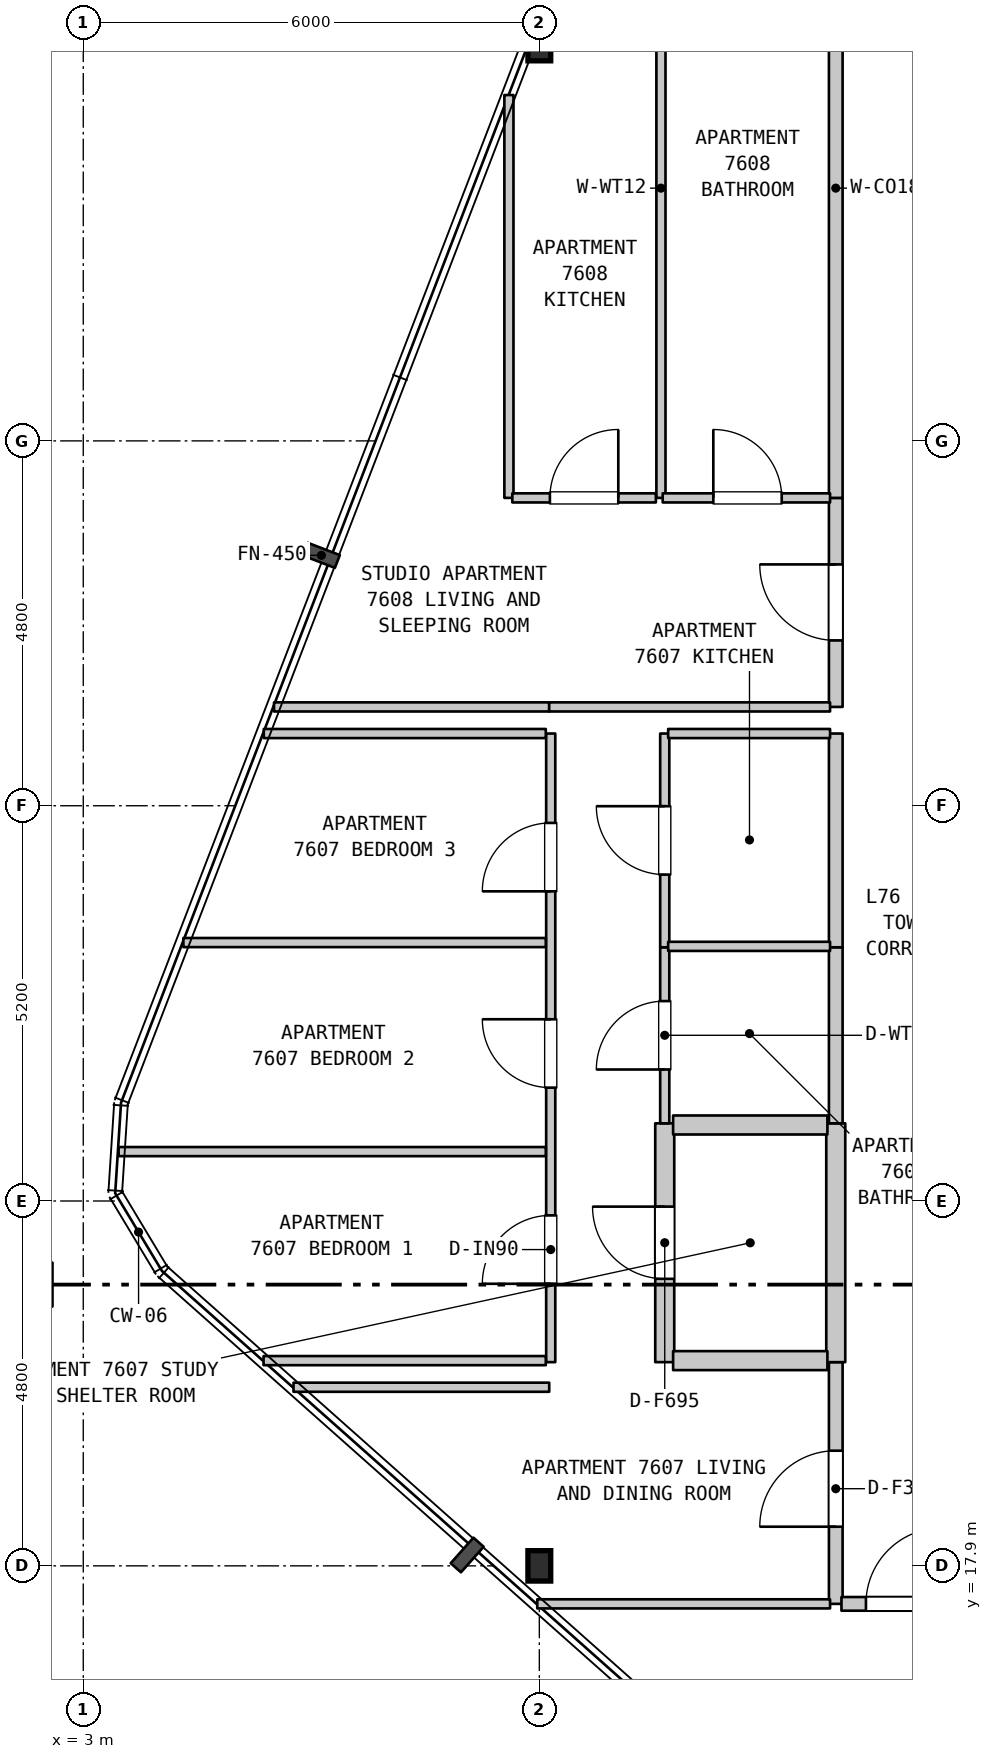
"""IFC4 building model, lengths in metres.
Left out: names, types, materials, properties, quantities, classifications, styles, units other than length and angle.
Written with IfcOpenShell. Run it as: python <this file> out.ifc"""

import sys

from ifc_helpers import new_model, si_unit, direction, frame, frame_2d, origin, origin_2d, place, context, subcontext, project, spatial, rectangle, i_section, extrude, element, fill, save


model = new_model("IFC4")
c1 = context("Model", 3, precision=1e-05, world=origin(), true_north=direction((0.0, 1.0)))
c2 = subcontext(c1, "Body", "Model", "MODEL_VIEW")
j1 = project(units=[si_unit("LENGTHUNIT", "METRE"), si_unit("PLANEANGLEUNIT", "RADIAN")], contexts=[c1])
p1 = place(None, origin())
s1 = spatial("IfcSite", under=j1, at=p1, CompositionType="ELEMENT")
p2 = place(p1, origin())
s2 = spatial("IfcBuilding", under=s1, at=p2, CompositionType="ELEMENT")
p3 = place(p2, frame((0.0, 0.0, 303.6)))
s3 = spatial("IfcBuildingStorey", under=s2, at=p3, CompositionType="ELEMENT", Elevation=303.6)
for number, where, z_axis, x_axis in (
    (1, (9.0, 17.9, 0.0), (0.0, 0.0, 1.0), (1.0, 0.0, 0.0)),
    (2, (9.0, 37.9, 0.0), (0.0, 0.0, 1.0), (1.0, 0.0, 0.0)),
):
    element("IfcColumn", number, at=place(p3, frame(where, z_axis=z_axis, x_axis=x_axis)), inside=s3, PredefinedType="COLUMN", context=c2, shape_type="SweptSolid", body=[
        extrude(i_section(OverallWidth=0.3, OverallDepth=0.4, WebThickness=0.013, FlangeThickness=0.024, FilletRadius=0.027, at=origin_2d()), origin(), (0.0, 0.0, 1.0), 3.7),
    ])
p4 = place(p3, frame((8.6, 31.95, 0.0), z_axis=(0.0, 0.0, 1.0), x_axis=(0.0, 1.0, 0.0)))
e3 = element("IfcWall", 3, at=p4, inside=s3, PredefinedType="PARTITIONING", context=c2, shape_type="SweptSolid", body=[
    extrude(rectangle(XDim=5.3, YDim=0.12, at=frame_2d((2.65, 0.0))), origin(), (0.0, 0.0, 1.0), 3.39),
])
p5 = place(p3, frame((9.15, 20.58, 0.0), z_axis=(0.0, 0.0, 1.0), x_axis=(0.0, 1.0, 0.0)))
e4 = element("IfcWall", 4, at=p5, inside=s3, PredefinedType="PARTITIONING", context=c2, shape_type="SweptSolid", body=[
    extrude(rectangle(XDim=8.27, YDim=0.12, at=frame_2d((4.135, 0.0))), origin(), (0.0, 0.0, 1.0), 2.79),
])
p6 = place(p5, frame((1.031, 0.0, 0.0)))
e5 = element("IfcOpeningElement", 5, at=p6, cuts=e4, PredefinedType="OPENING", context=c2, shape_type="SweptSolid", body=[
    extrude(rectangle(XDim=0.9, YDim=2.15, at=frame_2d((0.45, 1.075))), frame((0.0, 0.07, 0.0), z_axis=(0.0, -1.0, 0.0), x_axis=(1.0, 0.0, 0.0)), (0.0, 0.0, 1.0), 0.14),
])
p7 = place(p5, frame((3.611, 0.0, 0.0)))
e6 = element("IfcOpeningElement", 6, at=p7, cuts=e4, PredefinedType="OPENING", context=c2, shape_type="SweptSolid", body=[
    extrude(rectangle(XDim=0.9, YDim=2.15, at=frame_2d((0.45, 1.075))), frame((0.0, 0.07, 0.0), z_axis=(0.0, -1.0, 0.0), x_axis=(1.0, 0.0, 0.0)), (0.0, 0.0, 1.0), 0.14),
])
p8 = place(p5, frame((6.194, 0.0, 0.0)))
e7 = element("IfcOpeningElement", 7, at=p8, cuts=e4, PredefinedType="OPENING", context=c2, shape_type="SweptSolid", body=[
    extrude(rectangle(XDim=0.9, YDim=2.15, at=frame_2d((0.45, 1.075))), frame((0.0, 0.07, 0.0), z_axis=(0.0, -1.0, 0.0), x_axis=(1.0, 0.0, 0.0)), (0.0, 0.0, 1.0), 0.14),
])
p9 = place(p3, frame((10.6, 31.95, 0.0), z_axis=(0.0, 0.0, 1.0), x_axis=(0.0, 1.0, 0.0)))
e8 = element("IfcWall", 8, at=p9, inside=s3, PredefinedType="PARTITIONING", context=c2, shape_type="SweptSolid", body=[
    extrude(rectangle(XDim=8.15, YDim=0.12, at=frame_2d((4.075, 0.0))), origin(), (0.0, 0.0, 1.0), 3.39),
])
p10 = place(p3, frame((10.65, 20.58, 0.0), z_axis=(0.0, 0.0, 1.0), x_axis=(0.0, 1.0, 0.0)))
e9 = element("IfcWall", 9, at=p10, inside=s3, PredefinedType="STANDARD", context=c2, shape_type="SweptSolid", body=[
    extrude(rectangle(XDim=3.142, YDim=0.25, at=frame_2d((1.571, 0.0))), origin(), (0.0, 0.0, 1.0), 3.39),
])
p11 = place(p10, frame((1.096, 0.0, 0.0)))
e10 = element("IfcOpeningElement", 10, at=p11, cuts=e9, PredefinedType="OPENING", context=c2, shape_type="SweptSolid", body=[
    extrude(rectangle(XDim=0.95, YDim=2.15, at=frame_2d((0.475, 1.075))), frame((0.0, 0.135, 0.0), z_axis=(0.0, -1.0, 0.0), x_axis=(1.0, 0.0, 0.0)), (0.0, 0.0, 1.0), 0.27),
])
p12 = place(p3, frame((10.65, 23.722, 0.0), z_axis=(0.0, 0.0, 1.0), x_axis=(0.0, 1.0, 0.0)))
e11 = element("IfcWall", 11, at=p12, inside=s3, PredefinedType="PARTITIONING", context=c2, shape_type="SweptSolid", body=[
    extrude(rectangle(XDim=2.316, YDim=0.12, at=frame_2d((1.158, 0.0))), origin(), (0.0, 0.0, 1.0), 3.39),
])
p13 = place(p12, frame((0.708, 0.0, 0.0)))
e12 = element("IfcOpeningElement", 12, at=p13, cuts=e11, PredefinedType="OPENING", context=c2, shape_type="SweptSolid", body=[
    extrude(rectangle(XDim=0.9, YDim=2.1, at=frame_2d((0.45, 1.05))), frame((0.0, 0.07, 0.0), z_axis=(0.0, -1.0, 0.0), x_axis=(1.0, 0.0, 0.0)), (0.0, 0.0, 1.0), 0.14),
])
p14 = place(p3, frame((10.65, 26.038, 0.0), z_axis=(0.0, 0.0, 1.0), x_axis=(0.0, 1.0, 0.0)))
e13 = element("IfcWall", 13, at=p14, inside=s3, PredefinedType="PARTITIONING", context=c2, shape_type="SweptSolid", body=[
    extrude(rectangle(XDim=2.812, YDim=0.12, at=frame_2d((1.406, 0.0))), origin(), (0.0, 0.0, 1.0), 3.39),
])
p15 = place(p14, frame((0.956, 0.0, 0.0)))
e14 = element("IfcOpeningElement", 14, at=p15, cuts=e13, PredefinedType="OPENING", context=c2, shape_type="SweptSolid", body=[
    extrude(rectangle(XDim=0.9, YDim=2.15, at=frame_2d((0.45, 1.075))), frame((0.0, 0.07, 0.0), z_axis=(0.0, -1.0, 0.0), x_axis=(1.0, 0.0, 0.0)), (0.0, 0.0, 1.0), 0.14),
])
p16 = place(p3, frame((12.9, 17.4, 0.0), z_axis=(0.0, 0.0, 1.0), x_axis=(0.0, 1.0, 0.0)))
e15 = element("IfcWall", 15, at=p16, inside=s3, PredefinedType="STANDARD", context=c2, shape_type="SweptSolid", body=[
    extrude(rectangle(XDim=3.18, YDim=0.18, at=frame_2d((1.59, 0.0))), origin(), (0.0, 0.0, 1.0), 3.39),
])
p17 = place(p16, frame((1.015, 0.0, 0.0)))
e16 = element("IfcOpeningElement", 16, at=p17, cuts=e15, PredefinedType="OPENING", context=c2, shape_type="SweptSolid", body=[
    extrude(rectangle(XDim=1.0, YDim=2.15, at=frame_2d((0.5, 1.075))), frame((0.0, 0.1, 0.0), z_axis=(0.0, -1.0, 0.0), x_axis=(1.0, 0.0, 0.0)), (0.0, 0.0, 1.0), 0.2),
])
p18 = place(p3, frame((12.9, 20.58, 0.0), z_axis=(0.0, 0.0, 1.0), x_axis=(0.0, 1.0, 0.0)))
e17 = element("IfcWall", 17, at=p18, inside=s3, PredefinedType="STANDARD", context=c2, shape_type="SweptSolid", body=[
    extrude(rectangle(XDim=3.142, YDim=0.25, at=frame_2d((1.571, 0.0))), origin(), (0.0, 0.0, 1.0), 3.39),
])
p19 = place(p3, frame((12.9, 23.722, 0.0), z_axis=(0.0, 0.0, 1.0), x_axis=(0.0, 1.0, 0.0)))
e18 = element("IfcWall", 18, at=p19, inside=s3, PredefinedType="STANDARD", context=c2, shape_type="SweptSolid", body=[
    extrude(rectangle(XDim=2.316, YDim=0.18, at=frame_2d((1.158, 0.0))), origin(), (0.0, 0.0, 1.0), 3.39),
])
p20 = place(p3, frame((12.9, 26.038, 0.0), z_axis=(0.0, 0.0, 1.0), x_axis=(0.0, 1.0, 0.0)))
e19 = element("IfcWall", 19, at=p20, inside=s3, PredefinedType="STANDARD", context=c2, shape_type="SweptSolid", body=[
    extrude(rectangle(XDim=2.812, YDim=0.18, at=frame_2d((1.406, 0.0))), origin(), (0.0, 0.0, 1.0), 3.39),
])
p21 = place(p3, frame((12.9, 29.2, 0.0), z_axis=(0.0, 0.0, 1.0), x_axis=(0.0, 1.0, 0.0)))
e20 = element("IfcWall", 20, at=p21, inside=s3, PredefinedType="STANDARD", context=c2, shape_type="SweptSolid", body=[
    extrude(rectangle(XDim=2.75, YDim=0.18, at=frame_2d((1.375, 0.0))), origin(), (0.0, 0.0, 1.0), 3.39),
])
p22 = place(p21, frame((0.875, 0.0, 0.0)))
e21 = element("IfcOpeningElement", 21, at=p22, cuts=e20, PredefinedType="OPENING", context=c2, shape_type="SweptSolid", body=[
    extrude(rectangle(XDim=1.0, YDim=2.15, at=frame_2d((0.5, 1.075))), frame((0.0, 0.1, 0.0), z_axis=(0.0, -1.0, 0.0), x_axis=(1.0, 0.0, 0.0)), (0.0, 0.0, 1.0), 0.2),
])
p23 = place(p3, frame((12.9, 31.95, 0.0), z_axis=(0.0, 0.0, 1.0), x_axis=(0.0, 1.0, 0.0)))
e22 = element("IfcWall", 22, at=p23, inside=s3, PredefinedType="STANDARD", context=c2, shape_type="SweptSolid", body=[
    extrude(rectangle(XDim=8.15, YDim=0.18, at=frame_2d((4.075, 0.0))), origin(), (0.0, 0.0, 1.0), 3.39),
])
p24 = place(p3, frame((8.973, 17.4, 0.0), z_axis=(0.0, 0.0, 1.0), x_axis=(1.0, 0.0, 0.0)))
e23 = element("IfcWall", 23, at=p24, inside=s3, PredefinedType="PARTITIONING", context=c2, shape_type="SweptSolid", body=[
    extrude(rectangle(XDim=3.852, YDim=0.12, at=frame_2d((1.926, 0.0))), origin(), (0.0, 0.0, 1.0), 3.39),
])
p25 = place(p3, frame((12.975, 17.4, 0.0), z_axis=(0.0, 0.0, 1.0), x_axis=(1.0, 0.0, 0.0)))
e24 = element("IfcWall", 24, at=p25, inside=s3, PredefinedType="STANDARD", context=c2, shape_type="SweptSolid", body=[
    extrude(rectangle(XDim=3.68, YDim=0.18, at=frame_2d((1.84, 0.0))), origin(), (0.0, 0.0, 1.0), 3.39),
])
p26 = place(p25, frame((0.322, 0.0, 0.0)))
e25 = element("IfcOpeningElement", 25, at=p26, cuts=e24, PredefinedType="OPENING", context=c2, shape_type="SweptSolid", body=[
    extrude(rectangle(XDim=1.0, YDim=2.15, at=frame_2d((0.5, 1.075))), frame((0.0, 0.1, 0.0), z_axis=(0.0, -1.0, 0.0), x_axis=(1.0, 0.0, 0.0)), (0.0, 0.0, 1.0), 0.2),
])
p27 = place(p3, frame((5.766, 20.25, 0.0), z_axis=(0.0, 0.0, 1.0), x_axis=(1.0, 0.0, 0.0)))
e26 = element("IfcWall", 26, at=p27, inside=s3, PredefinedType="PARTITIONING", context=c2, shape_type="SweptSolid", body=[
    extrude(rectangle(XDim=3.364, YDim=0.12, at=frame_2d((1.682, 0.0))), origin(), (0.0, 0.0, 1.0), 3.39),
])
p28 = place(p3, frame((5.372, 20.6, 0.0), z_axis=(0.0, 0.0, 1.0), x_axis=(1.0, 0.0, 0.0)))
e27 = element("IfcWall", 27, at=p28, inside=s3, PredefinedType="PARTITIONING", context=c2, shape_type="SweptSolid", body=[
    extrude(rectangle(XDim=3.713, YDim=0.12, at=frame_2d((1.856, 0.0))), origin(), (0.0, 0.0, 1.0), 3.39),
])
p29 = place(p3, frame((10.76, 20.6, 0.0), z_axis=(0.0, 0.0, 1.0), x_axis=(1.0, 0.0, 0.0)))
e28 = element("IfcWall", 28, at=p29, inside=s3, PredefinedType="STANDARD", context=c2, shape_type="SweptSolid", body=[
    extrude(rectangle(XDim=2.03, YDim=0.25, at=frame_2d((1.015, 0.0))), origin(), (0.0, 0.0, 1.0), 3.39),
])
p30 = place(p3, frame((3.465, 23.35, 0.0), z_axis=(0.0, 0.0, 1.0), x_axis=(1.0, 0.0, 0.0)))
e29 = element("IfcWall", 29, at=p30, inside=s3, PredefinedType="PARTITIONING", context=c2, shape_type="SweptSolid", body=[
    extrude(rectangle(XDim=5.62, YDim=0.12, at=frame_2d((2.81, 0.0))), origin(), (0.0, 0.0, 1.0), 3.39),
])
p31 = place(p3, frame((10.76, 23.7, 0.0), z_axis=(0.0, 0.0, 1.0), x_axis=(1.0, 0.0, 0.0)))
e30 = element("IfcWall", 30, at=p31, inside=s3, PredefinedType="STANDARD", context=c2, shape_type="SweptSolid", body=[
    extrude(rectangle(XDim=2.03, YDim=0.25, at=frame_2d((1.015, 0.0))), origin(), (0.0, 0.0, 1.0), 3.39),
])
p32 = place(p3, frame((10.695, 26.05, 0.0), z_axis=(0.0, 0.0, 1.0), x_axis=(1.0, 0.0, 0.0)))
e31 = element("IfcWall", 31, at=p32, inside=s3, PredefinedType="PARTITIONING", context=c2, shape_type="SweptSolid", body=[
    extrude(rectangle(XDim=2.13, YDim=0.12, at=frame_2d((1.065, 0.0))), origin(), (0.0, 0.0, 1.0), 3.39),
])
p33 = place(p3, frame((4.317, 26.1, 0.0), z_axis=(0.0, 0.0, 1.0), x_axis=(1.0, 0.0, 0.0)))
e32 = element("IfcWall", 32, at=p33, inside=s3, PredefinedType="PARTITIONING", context=c2, shape_type="SweptSolid", body=[
    extrude(rectangle(XDim=4.768, YDim=0.12, at=frame_2d((2.384, 0.0))), origin(), (0.0, 0.0, 1.0), 3.39),
])
p34 = place(p3, frame((5.375, 28.85, 0.0), z_axis=(0.0, 0.0, 1.0), x_axis=(1.0, 0.0, 0.0)))
e33 = element("IfcWall", 33, at=p34, inside=s3, PredefinedType="PARTITIONING", context=c2, shape_type="SweptSolid", body=[
    extrude(rectangle(XDim=3.71, YDim=0.12, at=frame_2d((1.855, 0.0))), origin(), (0.0, 0.0, 1.0), 3.39),
])
p35 = place(p3, frame((10.695, 28.85, 0.0), z_axis=(0.0, 0.0, 1.0), x_axis=(1.0, 0.0, 0.0)))
e34 = element("IfcWall", 34, at=p35, inside=s3, PredefinedType="PARTITIONING", context=c2, shape_type="SweptSolid", body=[
    extrude(rectangle(XDim=2.13, YDim=0.12, at=frame_2d((1.065, 0.0))), origin(), (0.0, 0.0, 1.0), 3.39),
])
p36 = place(p3, frame((5.51, 29.2, 0.0), z_axis=(0.0, 0.0, 1.0), x_axis=(1.0, 0.0, 0.0)))
e35 = element("IfcWall", 35, at=p36, inside=s3, PredefinedType="PARTITIONING", context=c2, shape_type="SweptSolid", body=[
    extrude(rectangle(XDim=3.62, YDim=0.12, at=frame_2d((1.81, 0.0))), origin(), (0.0, 0.0, 1.0), 3.39),
])
p37 = place(p3, frame((9.13, 29.2, 0.0), z_axis=(0.0, 0.0, 1.0), x_axis=(1.0, 0.0, 0.0)))
e36 = element("IfcWall", 36, at=p37, inside=s3, PredefinedType="PARTITIONING", context=c2, shape_type="SweptSolid", body=[
    extrude(rectangle(XDim=3.695, YDim=0.12, at=frame_2d((1.848, 0.0))), origin(), (0.0, 0.0, 1.0), 3.39),
])
p38 = place(p3, frame((8.645, 31.95, 0.0), z_axis=(0.0, 0.0, 1.0), x_axis=(1.0, 0.0, 0.0)))
e37 = element("IfcWall", 37, at=p38, inside=s3, PredefinedType="PARTITIONING", context=c2, shape_type="SweptSolid", body=[
    extrude(rectangle(XDim=1.888, YDim=0.12, at=frame_2d((0.944, 0.0))), origin(), (0.0, 0.0, 1.0), 3.39),
])
p39 = place(p38, frame((0.494, 0.0, 0.0)))
e38 = element("IfcOpeningElement", 38, at=p39, cuts=e37, PredefinedType="OPENING", context=c2, shape_type="SweptSolid", body=[
    extrude(rectangle(XDim=0.9, YDim=2.15, at=frame_2d((0.45, 1.075))), frame((0.0, 0.07, 0.0), z_axis=(0.0, -1.0, 0.0), x_axis=(1.0, 0.0, 0.0)), (0.0, 0.0, 1.0), 0.14),
])
p40 = place(p3, frame((10.623, 31.95, 0.0), z_axis=(0.0, 0.0, 1.0), x_axis=(1.0, 0.0, 0.0)))
e39 = element("IfcWall", 39, at=p40, inside=s3, PredefinedType="PARTITIONING", context=c2, shape_type="SweptSolid", body=[
    extrude(rectangle(XDim=2.202, YDim=0.12, at=frame_2d((1.101, 0.0))), origin(), (0.0, 0.0, 1.0), 3.39),
])
p41 = place(p40, frame((0.666, 0.0, 0.0)))
e40 = element("IfcOpeningElement", 40, at=p41, cuts=e39, PredefinedType="OPENING", context=c2, shape_type="SweptSolid", body=[
    extrude(rectangle(XDim=0.9, YDim=2.1, at=frame_2d((0.45, 1.05))), frame((0.0, 0.07, 0.0), z_axis=(0.0, -1.0, 0.0), x_axis=(1.0, 0.0, 0.0)), (0.0, 0.0, 1.0), 0.14),
])
p42 = place(p6, origin())
e41 = element("IfcDoor", 41, at=p42, inside=s3, OperationType="SINGLE_SWING_LEFT", PredefinedType="DOOR", context=c2, shape_type="SweptSolid", body=[
    extrude(rectangle(XDim=0.9, YDim=2.15, at=frame_2d((0.45, 1.075))), frame((0.0, 0.025, 0.0), z_axis=(0.0, -1.0, 0.0), x_axis=(1.0, 0.0, 0.0)), (0.0, 0.0, 1.0), 0.05),
])
fill(e5, e41)
p43 = place(p7, origin())
e42 = element("IfcDoor", 42, at=p43, inside=s3, OperationType="SINGLE_SWING_RIGHT", PredefinedType="DOOR", context=c2, shape_type="SweptSolid", body=[
    extrude(rectangle(XDim=0.9, YDim=2.15, at=frame_2d((0.45, 1.075))), frame((0.0, 0.025, 0.0), z_axis=(0.0, -1.0, 0.0), x_axis=(1.0, 0.0, 0.0)), (0.0, 0.0, 1.0), 0.05),
])
fill(e6, e42)
p44 = place(p8, origin())
e43 = element("IfcDoor", 43, at=p44, inside=s3, OperationType="SINGLE_SWING_LEFT", PredefinedType="DOOR", context=c2, shape_type="SweptSolid", body=[
    extrude(rectangle(XDim=0.9, YDim=2.15, at=frame_2d((0.45, 1.075))), frame((0.0, 0.025, 0.0), z_axis=(0.0, -1.0, 0.0), x_axis=(1.0, 0.0, 0.0)), (0.0, 0.0, 1.0), 0.05),
])
fill(e7, e43)
p45 = place(p11, origin())
e44 = element("IfcDoor", 44, at=p45, inside=s3, OperationType="SINGLE_SWING_RIGHT", PredefinedType="DOOR", context=c2, shape_type="SweptSolid", body=[
    extrude(rectangle(XDim=0.95, YDim=2.15, at=frame_2d((0.475, 1.075))), frame((0.0, 0.025, 0.0), z_axis=(0.0, -1.0, 0.0), x_axis=(1.0, 0.0, 0.0)), (0.0, 0.0, 1.0), 0.05),
])
fill(e10, e44)
p46 = place(p13, origin())
e45 = element("IfcDoor", 45, at=p46, inside=s3, OperationType="SINGLE_SWING_LEFT", PredefinedType="DOOR", context=c2, shape_type="SweptSolid", body=[
    extrude(rectangle(XDim=0.9, YDim=2.1, at=frame_2d((0.45, 1.05))), frame((0.0, 0.025, 0.0), z_axis=(0.0, -1.0, 0.0), x_axis=(1.0, 0.0, 0.0)), (0.0, 0.0, 1.0), 0.05),
])
fill(e12, e45)
p47 = place(p15, origin())
e46 = element("IfcDoor", 46, at=p47, inside=s3, OperationType="SINGLE_SWING_RIGHT", PredefinedType="DOOR", context=c2, shape_type="SweptSolid", body=[
    extrude(rectangle(XDim=0.9, YDim=2.15, at=frame_2d((0.45, 1.075))), frame((0.0, 0.025, 0.0), z_axis=(0.0, -1.0, 0.0), x_axis=(1.0, 0.0, 0.0)), (0.0, 0.0, 1.0), 0.05),
])
fill(e14, e46)
p48 = place(p17, origin())
e47 = element("IfcDoor", 47, at=p48, inside=s3, OperationType="SINGLE_SWING_LEFT", PredefinedType="DOOR", context=c2, shape_type="SweptSolid", body=[
    extrude(rectangle(XDim=1.0, YDim=2.15, at=frame_2d((0.5, 1.075))), frame((0.0, 0.025, 0.0), z_axis=(0.0, -1.0, 0.0), x_axis=(1.0, 0.0, 0.0)), (0.0, 0.0, 1.0), 0.05),
])
fill(e16, e47)
p49 = place(p22, origin())
e48 = element("IfcDoor", 48, at=p49, inside=s3, OperationType="SINGLE_SWING_RIGHT", PredefinedType="DOOR", context=c2, shape_type="SweptSolid", body=[
    extrude(rectangle(XDim=1.0, YDim=2.15, at=frame_2d((0.5, 1.075))), frame((0.0, 0.025, 0.0), z_axis=(0.0, -1.0, 0.0), x_axis=(1.0, 0.0, 0.0)), (0.0, 0.0, 1.0), 0.05),
])
fill(e21, e48)
p50 = place(p26, origin())
e49 = element("IfcDoor", 49, at=p50, inside=s3, OperationType="SINGLE_SWING_RIGHT", PredefinedType="DOOR", context=c2, shape_type="SweptSolid", body=[
    extrude(rectangle(XDim=1.0, YDim=2.15, at=frame_2d((0.5, 1.075))), frame((0.0, 0.025, 0.0), z_axis=(0.0, -1.0, 0.0), x_axis=(1.0, 0.0, 0.0)), (0.0, 0.0, 1.0), 0.05),
])
fill(e25, e49)
p51 = place(p39, origin())
e50 = element("IfcDoor", 50, at=p51, inside=s3, OperationType="SINGLE_SWING_RIGHT", PredefinedType="DOOR", context=c2, shape_type="SweptSolid", body=[
    extrude(rectangle(XDim=0.9, YDim=2.15, at=frame_2d((0.45, 1.075))), frame((0.0, 0.025, 0.0), z_axis=(0.0, -1.0, 0.0), x_axis=(1.0, 0.0, 0.0)), (0.0, 0.0, 1.0), 0.05),
])
fill(e38, e50)
p52 = place(p41, origin())
e51 = element("IfcDoor", 51, at=p52, inside=s3, OperationType="SINGLE_SWING_LEFT", PredefinedType="DOOR", context=c2, shape_type="SweptSolid", body=[
    extrude(rectangle(XDim=0.9, YDim=2.1, at=frame_2d((0.45, 1.05))), frame((0.0, 0.025, 0.0), z_axis=(0.0, -1.0, 0.0), x_axis=(1.0, 0.0, 0.0)), (0.0, 0.0, 1.0), 0.05),
])
fill(e40, e51)
save(model, sys.argv[1])
